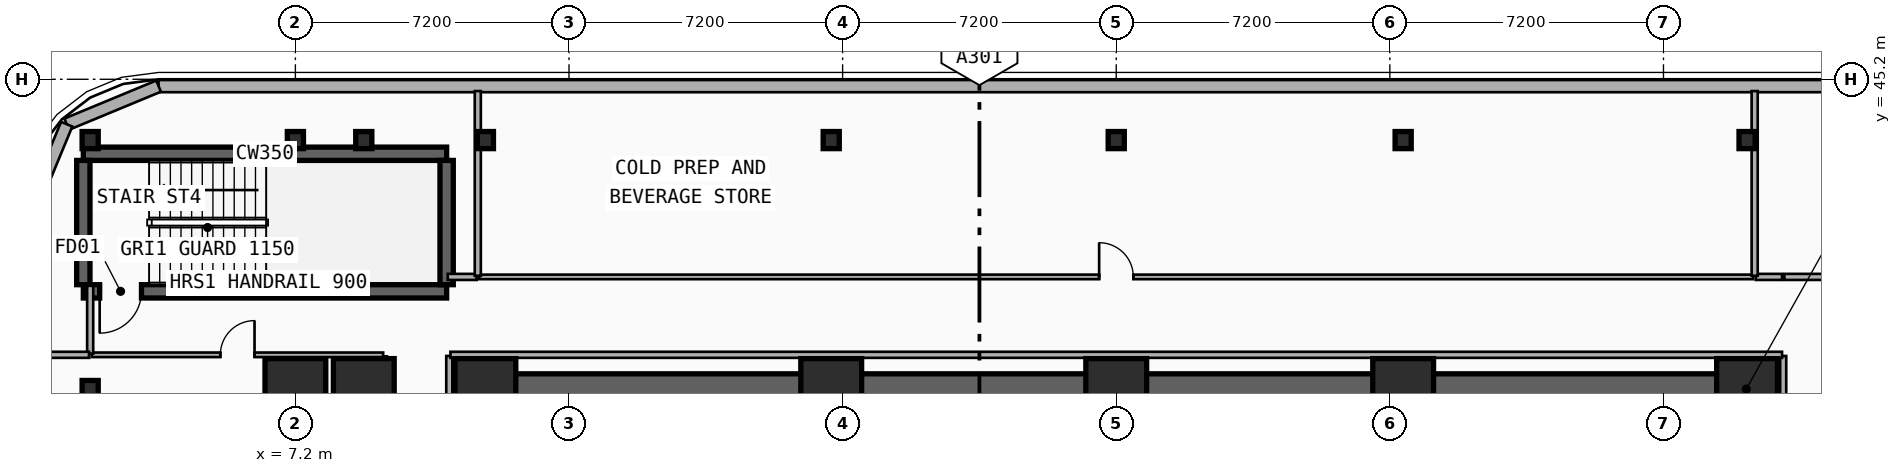
"""IFC4 building model, lengths in metres.
Left out: names, types, materials, properties, quantities, classifications, styles, units other than length and angle.
Written with IfcOpenShell. Run it as: python <this file> out.ifc"""

import sys

from ifc_helpers import new_model, si_unit, direction, frame, frame_2d, origin, origin_2d, place, context, subcontext, project, spatial, rectangle, i_section, extrude, element, fill, save


model = new_model("IFC4")
c1 = context("Model", 3, precision=1e-05, world=origin(), true_north=direction((0.0, 1.0)))
c2 = subcontext(c1, "Body", "Model", "MODEL_VIEW")
j1 = project(units=[si_unit("LENGTHUNIT", "METRE"), si_unit("PLANEANGLEUNIT", "RADIAN")], contexts=[c1])
p1 = place(None, origin())
s1 = spatial("IfcSite", under=j1, at=p1, CompositionType="ELEMENT")
p2 = place(p1, origin())
s2 = spatial("IfcBuilding", under=s1, at=p2, CompositionType="ELEMENT")
p3 = place(p2, frame((0.0, 0.0, 14.9)))
s3 = spatial("IfcBuildingStorey", under=s2, at=p3, CompositionType="ELEMENT", Elevation=14.9)
p4 = place(p3, frame((12.15, 37.05, 0.0), z_axis=(0.0, 0.0, 1.0), x_axis=(1.0, 0.0, 0.0)))
e1 = element("IfcWall", 1, at=p4, inside=s3, PredefinedType="SHEAR", context=c2, shape_type="SweptSolid", body=[
    extrude(rectangle(XDim=33.23, YDim=0.8, at=frame_2d((16.615, 0.0))), origin(), (0.0, 0.0, 1.0), 4.5),
])
p5 = place(p3, frame((1.62, 43.24, 0.0), z_axis=(0.0, 0.0, 1.0), x_axis=(1.0, 0.0, 0.0)))
e2 = element("IfcWall", 2, at=p5, inside=s3, PredefinedType="SHEAR", context=c2, shape_type="SweptSolid", body=[
    extrude(rectangle(XDim=9.56, YDim=0.35, at=frame_2d((4.78, 0.0))), origin(), (0.0, 0.0, 1.0), 4.5),
])
p6 = place(p3, frame((11.18, 39.62, 0.0), z_axis=(0.0, 0.0, 1.0), x_axis=(-1.0, 0.0, 0.0)))
e3 = element("IfcWall", 3, at=p6, inside=s3, PredefinedType="SHEAR", context=c2, shape_type="SweptSolid", body=[
    extrude(rectangle(XDim=9.56, YDim=0.35, at=frame_2d((4.78, 0.0))), origin(), (0.0, 0.0, 1.0), 4.5),
])
p7 = place(p6, frame((8.03, 0.0, 0.0)))
e4 = element("IfcOpeningElement", 4, at=p7, cuts=e3, PredefinedType="OPENING", context=c2, shape_type="SweptSolid", body=[
    extrude(rectangle(XDim=1.1, YDim=2.15, at=frame_2d((0.55, 1.075))), frame((0.0, 0.185, 0.0), z_axis=(0.0, -1.0, 0.0), x_axis=(1.0, 0.0, 0.0)), (0.0, 0.0, 1.0), 0.37),
])
for number, where, z_axis, x_axis in (
    (5, (1.62, 39.795, 0.0), (0.0, 0.0, 1.0), (0.0, 1.0, 0.0)),
    (6, (11.18, 39.795, 0.0), (0.0, 0.0, 1.0), (0.0, 1.0, 0.0)),
):
    element("IfcWall", number, at=place(p3, frame(where, z_axis=z_axis, x_axis=x_axis)), inside=s3, PredefinedType="SHEAR", context=c2, shape_type="SweptSolid", body=[
        extrude(rectangle(XDim=3.27, YDim=0.35, at=frame_2d((1.635, 0.0))), origin(), (0.0, 0.0, 1.0), 4.5),
    ])
for number, where, z_axis, x_axis in (
    (7, (12.2, 37.05, 0.0), (0.0, 0.0, 1.0), (1.0, 0.0, 0.0)),
    (8, (21.3, 37.05, 0.0), (0.0, 0.0, 1.0), (1.0, 0.0, 0.0)),
    (9, (28.8, 37.05, 0.0), (0.0, 0.0, 1.0), (1.0, 0.0, 0.0)),
    (10, (36.35, 37.05, 0.0), (0.0, 0.0, 1.0), (1.0, 0.0, 0.0)),
    (11, (45.4, 37.05, 0.0), (0.0, 0.0, 1.0), (1.0, 0.0, 0.0)),
):
    element("IfcColumn", number, at=place(p3, frame(where, z_axis=z_axis, x_axis=x_axis)), inside=s3, PredefinedType="COLUMN", context=c2, shape_type="SweptSolid", body=[
        extrude(rectangle(XDim=1.6, YDim=1.6, at=origin_2d()), origin(), (0.0, 0.0, 1.0), 4.5),
    ])
for number, where, z_axis, x_axis in (
    (12, (1.8, 37.05, 0.0), (0.0, 0.0, 1.0), (1.0, 0.0, 0.0)),
    (13, (1.8, 43.6, 0.0), (0.0, 0.0, 1.0), (1.0, 0.0, 0.0)),
):
    element("IfcColumn", number, at=place(p3, frame(where, z_axis=z_axis, x_axis=x_axis)), inside=s3, PredefinedType="COLUMN", context=c2, shape_type="SweptSolid", body=[
        extrude(i_section(OverallWidth=0.424, OverallDepth=0.45, WebThickness=0.041, FlangeThickness=0.065, FilletRadius=0.015, at=origin_2d()), origin(), (0.0, 0.0, 1.0), 4.5),
    ])
p8 = place(p3, frame((7.2, 37.05, 0.0), z_axis=(0.0, 0.0, 1.0), x_axis=(1.0, 0.0, 0.0)))
e14 = element("IfcColumn", 14, at=p8, inside=s3, PredefinedType="COLUMN", context=c2, shape_type="SweptSolid", body=[
    extrude(rectangle(XDim=1.6, YDim=1.6, at=origin_2d()), origin(), (0.0, 0.0, 1.0), 4.5),
])
p9 = place(p3, frame((7.2, 43.6, 0.0), z_axis=(0.0, 0.0, 1.0), x_axis=(1.0, 0.0, 0.0)))
e15 = element("IfcColumn", 15, at=p9, inside=s3, PredefinedType="COLUMN", context=c2, shape_type="SweptSolid", body=[
    extrude(i_section(OverallWidth=0.424, OverallDepth=0.45, WebThickness=0.041, FlangeThickness=0.065, FilletRadius=0.015, at=origin_2d()), origin(), (0.0, 0.0, 1.0), 4.5),
])
p10 = place(p3, frame((9.0, 37.05, 0.0), z_axis=(0.0, 0.0, 1.0), x_axis=(1.0, 0.0, 0.0)))
e16 = element("IfcColumn", 16, at=p10, inside=s3, PredefinedType="COLUMN", context=c2, shape_type="SweptSolid", body=[
    extrude(rectangle(XDim=1.6, YDim=1.6, at=origin_2d()), origin(), (0.0, 0.0, 1.0), 4.5),
])
for number, where, z_axis, x_axis in (
    (17, (9.0, 43.6, 0.0), (0.0, 0.0, 1.0), (1.0, 0.0, 0.0)),
    (18, (12.2, 43.6, 0.0), (0.0, 0.0, 1.0), (1.0, 0.0, 0.0)),
    (19, (21.3, 43.6, 0.0), (0.0, 0.0, 1.0), (1.0, 0.0, 0.0)),
    (20, (28.8, 43.6, 0.0), (0.0, 0.0, 1.0), (1.0, 0.0, 0.0)),
    (21, (36.35, 43.6, 0.0), (0.0, 0.0, 1.0), (1.0, 0.0, 0.0)),
    (22, (45.4, 43.6, 0.0), (0.0, 0.0, 1.0), (1.0, 0.0, 0.0)),
):
    element("IfcColumn", number, at=place(p3, frame(where, z_axis=z_axis, x_axis=x_axis)), inside=s3, PredefinedType="COLUMN", context=c2, shape_type="SweptSolid", body=[
        extrude(i_section(OverallWidth=0.424, OverallDepth=0.45, WebThickness=0.041, FlangeThickness=0.065, FilletRadius=0.015, at=origin_2d()), origin(), (0.0, 0.0, 1.0), 4.5),
    ])
p11 = place(p3, frame((3.6, 45.02, 0.0), z_axis=(0.0, 0.0, 1.0), x_axis=(1.0, 0.0, 0.0)))
e23 = element("IfcWall", 23, at=p11, inside=s3, PredefinedType="SOLIDWALL", context=c2, shape_type="SweptSolid", body=[
    extrude(rectangle(XDim=50.4, YDim=0.32, at=frame_2d((25.2, 0.0))), origin(), (0.0, 0.0, 1.0), 4.2),
])
p12 = place(p3, frame((1.182, 44.018, 0.0), z_axis=(0.0, 0.0, 1.0), x_axis=(0.923886112352, 0.382667546838, 0.0)))
e24 = element("IfcWall", 24, at=p12, inside=s3, PredefinedType="SOLIDWALL", context=c2, shape_type="SweptSolid", body=[
    extrude(rectangle(XDim=2.618, YDim=0.32, at=frame_2d((1.309, 0.0))), origin(), (0.0, 0.0, 1.0), 4.2),
])
p13 = place(p3, frame((0.18, 41.6, 0.0), z_axis=(0.0, 0.0, 1.0), x_axis=(0.382700522567, 0.923872453333, 0.0)))
e25 = element("IfcWall", 25, at=p13, inside=s3, PredefinedType="SOLIDWALL", context=c2, shape_type="SweptSolid", body=[
    extrude(rectangle(XDim=2.617, YDim=0.32, at=frame_2d((1.309, 0.0))), origin(), (0.0, 0.0, 1.0), 4.2),
])
p14 = place(p3, frame((9.55, 27.64, 0.0), z_axis=(0.0, 0.0, 1.0), x_axis=(0.0, 1.0, 0.0)))
e26 = element("IfcWall", 26, at=p14, inside=s3, PredefinedType="PARTITIONING", context=c2, shape_type="SweptSolid", body=[
    extrude(rectangle(XDim=10.27, YDim=0.12, at=frame_2d((5.135, 0.0))), origin(), (0.0, 0.0, 1.0), 4.2),
])
p15 = place(p14, frame((4.685, 0.0, 0.0)))
e27 = element("IfcOpeningElement", 27, at=p15, cuts=e26, PredefinedType="OPENING", context=c2, shape_type="SweptSolid", body=[
    extrude(rectangle(XDim=0.9, YDim=2.1, at=frame_2d((0.45, 1.05))), frame((0.0, 0.07, 0.0), z_axis=(0.0, -1.0, 0.0), x_axis=(1.0, 0.0, 0.0)), (0.0, 0.0, 1.0), 0.14),
])
p16 = place(p3, frame((1.84, 37.95, 0.0), z_axis=(0.0, 0.0, 1.0), x_axis=(1.0, 0.0, 0.0)))
e28 = element("IfcWall", 28, at=p16, inside=s3, PredefinedType="PARTITIONING", context=c2, shape_type="SweptSolid", body=[
    extrude(rectangle(XDim=7.67, YDim=0.12, at=frame_2d((3.835, 0.0))), origin(), (0.0, 0.0, 1.0), 4.2),
])
p17 = place(p16, frame((3.385, 0.0, 0.0)))
e29 = element("IfcOpeningElement", 29, at=p17, cuts=e28, PredefinedType="OPENING", context=c2, shape_type="SweptSolid", body=[
    extrude(rectangle(XDim=0.9, YDim=2.1, at=frame_2d((0.45, 1.05))), frame((0.0, 0.07, 0.0), z_axis=(0.0, -1.0, 0.0), x_axis=(1.0, 0.0, 0.0)), (0.0, 0.0, 1.0), 0.14),
])
p18 = place(p3, frame((12.04, 40.0, 0.0), z_axis=(0.0, 0.0, 1.0), x_axis=(1.0, 0.0, 0.0)))
e30 = element("IfcWall", 30, at=p18, inside=s3, PredefinedType="PARTITIONING", context=c2, shape_type="SweptSolid", body=[
    extrude(rectangle(XDim=33.52, YDim=0.12, at=frame_2d((16.76, 0.0))), origin(), (0.0, 0.0, 1.0), 3.53),
])
p19 = place(p18, frame((16.31, 0.0, 0.0)))
e31 = element("IfcOpeningElement", 31, at=p19, cuts=e30, PredefinedType="OPENING", context=c2, shape_type="SweptSolid", body=[
    extrude(rectangle(XDim=0.9, YDim=2.1, at=frame_2d((0.45, 1.05))), frame((0.0, 0.07, 0.0), z_axis=(0.0, -1.0, 0.0), x_axis=(1.0, 0.0, 0.0)), (0.0, 0.0, 1.0), 0.14),
])
p20 = place(p3, frame((11.25, 27.63, 0.0), z_axis=(0.0, 0.0, 1.0), x_axis=(0.0, 1.0, 0.0)))
e32 = element("IfcWall", 32, at=p20, inside=s3, PredefinedType="PARTITIONING", context=c2, shape_type="SweptSolid", body=[
    extrude(rectangle(XDim=10.29, YDim=0.16, at=frame_2d((5.145, 0.0))), origin(), (0.0, 0.0, 1.0), 4.2),
])
p21 = place(p3, frame((46.38, 40.0, 0.0), z_axis=(0.0, 0.0, 1.0), x_axis=(1.0, 0.0, 0.0)))
e33 = element("IfcWall", 33, at=p21, inside=s3, PredefinedType="PARTITIONING", context=c2, shape_type="SweptSolid", body=[
    extrude(rectangle(XDim=1.64, YDim=0.16, at=frame_2d((0.82, 0.0))), origin(), (0.0, 0.0, 1.0), 4.2),
])
p22 = place(p3, frame((46.35, 27.63, 0.0), z_axis=(0.0, 0.0, 1.0), x_axis=(0.0, 1.0, 0.0)))
e34 = element("IfcWall", 34, at=p22, inside=s3, PredefinedType="PARTITIONING", context=c2, shape_type="SweptSolid", body=[
    extrude(rectangle(XDim=10.29, YDim=0.16, at=frame_2d((5.145, 0.0))), origin(), (0.0, 0.0, 1.0), 4.2),
])
p23 = place(p3, frame((11.28, 37.95, 0.0), z_axis=(0.0, 0.0, 1.0), x_axis=(1.0, 0.0, 0.0)))
e35 = element("IfcWall", 35, at=p23, inside=s3, PredefinedType="PARTITIONING", context=c2, shape_type="SweptSolid", body=[
    extrude(rectangle(XDim=35.04, YDim=0.16, at=frame_2d((17.52, 0.0))), origin(), (0.0, 0.0, 1.0), 3.53),
])
p24 = place(p3, frame((11.21, 40.0, 0.0), z_axis=(0.0, 0.0, 1.0), x_axis=(1.0, 0.0, 0.0)))
e36 = element("IfcWall", 36, at=p24, inside=s3, PredefinedType="PARTITIONING", context=c2, shape_type="SweptSolid", body=[
    extrude(rectangle(XDim=0.76, YDim=0.16, at=frame_2d((0.38, 0.0))), origin(), (0.0, 0.0, 1.0), 3.53),
])
p25 = place(p3, frame((45.63, 40.0, 0.0), z_axis=(0.0, 0.0, 1.0), x_axis=(1.0, 0.0, 0.0)))
e37 = element("IfcWall", 37, at=p25, inside=s3, PredefinedType="PARTITIONING", context=c2, shape_type="SweptSolid", body=[
    extrude(rectangle(XDim=0.69, YDim=0.16, at=frame_2d((0.345, 0.0))), origin(), (0.0, 0.0, 1.0), 3.53),
])
p26 = place(p3, frame((1.8, 37.98, 0.0), z_axis=(0.0, 0.0, 1.0), x_axis=(0.0, 1.0, 0.0)))
e38 = element("IfcWall", 38, at=p26, inside=s3, PredefinedType="PARTITIONING", context=c2, shape_type="SweptSolid", body=[
    extrude(rectangle(XDim=1.785, YDim=0.16, at=frame_2d((0.893, 0.0))), origin(), (0.0, 0.0, 1.0), 4.2),
])
p27 = place(p3, frame((0.31, 37.95, 0.0), z_axis=(0.0, 0.0, 1.0), x_axis=(1.0, 0.0, 0.0)))
e39 = element("IfcWall", 39, at=p27, inside=s3, PredefinedType="PARTITIONING", context=c2, shape_type="SweptSolid", body=[
    extrude(rectangle(XDim=1.46, YDim=0.16, at=frame_2d((0.73, 0.0))), origin(), (0.0, 0.0, 1.0), 4.2),
])
for number, where, z_axis, x_axis in (
    (40, (12.0, 40.03, 0.0), (0.0, 0.0, 1.0), (0.0, 1.0, 0.0)),
    (41, (45.6, 40.03, 0.0), (0.0, 0.0, 1.0), (0.0, 1.0, 0.0)),
):
    element("IfcWall", number, at=place(p3, frame(where, z_axis=z_axis, x_axis=x_axis)), inside=s3, PredefinedType="PARTITIONING", context=c2, shape_type="SweptSolid", body=[
        extrude(rectangle(XDim=4.86, YDim=0.16, at=frame_2d((2.43, 0.0))), origin(), (0.0, 0.0, 1.0), 3.53),
    ])
p28 = place(p7, origin())
e42 = element("IfcDoor", 42, at=p28, inside=s3, OperationType="SINGLE_SWING_RIGHT", PredefinedType="DOOR", context=c2, shape_type="SweptSolid", body=[
    extrude(rectangle(XDim=1.1, YDim=2.15, at=frame_2d((0.55, 1.075))), frame((0.0, 0.025, 0.0), z_axis=(0.0, -1.0, 0.0), x_axis=(1.0, 0.0, 0.0)), (0.0, 0.0, 1.0), 0.05),
])
fill(e4, e42)
p29 = place(p17, origin())
e43 = element("IfcDoor", 43, at=p29, inside=s3, OperationType="SINGLE_SWING_RIGHT", PredefinedType="DOOR", context=c2, shape_type="SweptSolid", body=[
    extrude(rectangle(XDim=0.9, YDim=2.1, at=frame_2d((0.45, 1.05))), frame((0.0, 0.025, 0.0), z_axis=(0.0, -1.0, 0.0), x_axis=(1.0, 0.0, 0.0)), (0.0, 0.0, 1.0), 0.05),
])
fill(e29, e43)
p30 = place(p19, origin())
e44 = element("IfcDoor", 44, at=p30, inside=s3, OperationType="SINGLE_SWING_LEFT", PredefinedType="DOOR", context=c2, shape_type="SweptSolid", body=[
    extrude(rectangle(XDim=0.9, YDim=2.1, at=frame_2d((0.45, 1.05))), frame((0.0, 0.025, 0.0), z_axis=(0.0, -1.0, 0.0), x_axis=(1.0, 0.0, 0.0)), (0.0, 0.0, 1.0), 0.05),
])
fill(e31, e44)
save(model, sys.argv[1])
